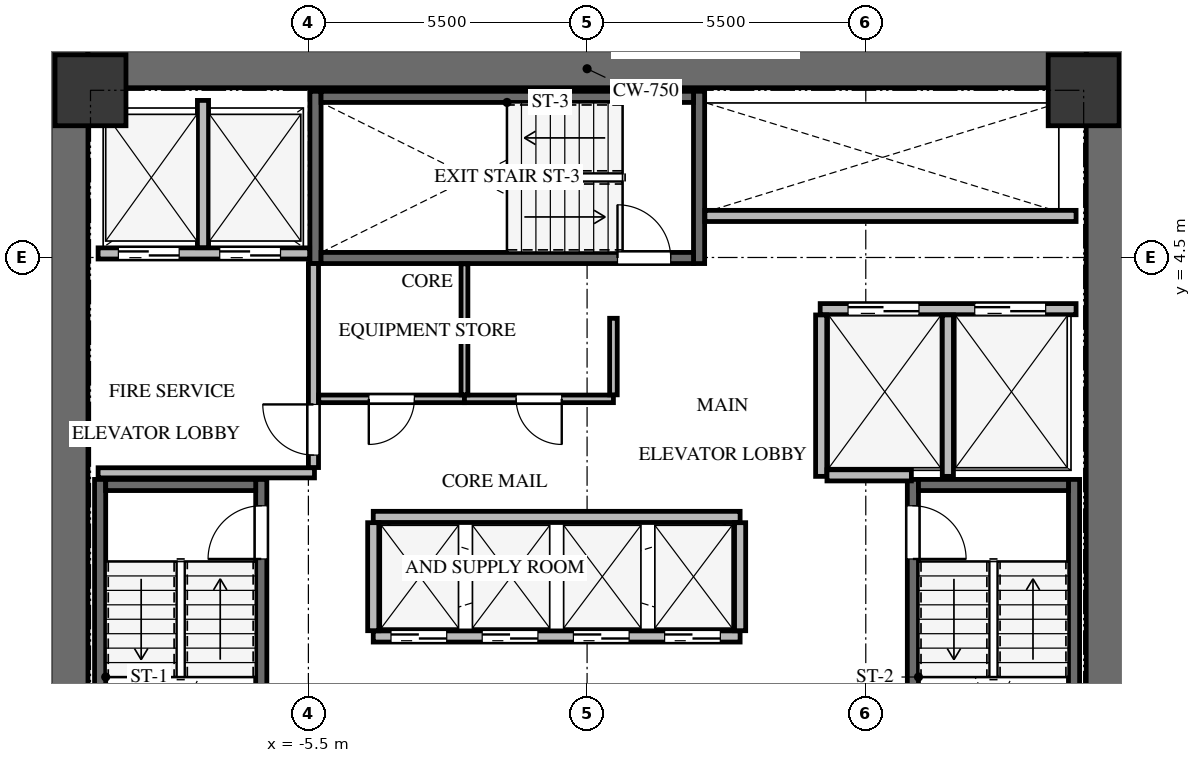
"""IFC4 building model, lengths in metres.
Left out: names, types, materials, properties, quantities, classifications, styles, units other than length and angle.
Written with IfcOpenShell. Run it as: python <this file> out.ifc"""

import sys

from ifc_helpers import new_model, si_unit, direction, frame, frame_2d, origin, origin_2d, place, context, subcontext, project, spatial, rectangle, extrude, source, transform, mapped, element, fill, save


model = new_model("IFC4")
c1 = context("Model", 3, precision=1e-05, world=origin(), true_north=direction((0.0, 1.0)))
c2 = subcontext(c1, "Body", "Model", "MODEL_VIEW")
j1 = project(units=[si_unit("LENGTHUNIT", "METRE"), si_unit("PLANEANGLEUNIT", "RADIAN")], contexts=[c1])
p1 = place(None, origin())
s1 = spatial("IfcSite", under=j1, at=p1, CompositionType="ELEMENT")
p2 = place(p1, origin())
s2 = spatial("IfcBuilding", under=s1, at=p2, CompositionType="ELEMENT")
p3 = place(p2, frame((0.0, 0.0, 143.1)))
s3 = spatial("IfcBuildingStorey", under=s2, at=p3, CompositionType="ELEMENT", Elevation=143.1)
for number, where, z_axis, x_axis in (
    (1, (-10.225, -8.6, 0.0), (0.0, 0.0, 1.0), (0.0, 1.0, 0.0)),
    (2, (10.225, -8.6, 0.0), (0.0, 0.0, 1.0), (0.0, 1.0, 0.0)),
):
    element("IfcWall", number, at=place(p3, frame(where, z_axis=z_axis, x_axis=x_axis)), inside=s3, PredefinedType="SHEAR", context=c2, shape_type="SweptSolid", body=[
        extrude(rectangle(XDim=17.2, YDim=0.75, at=frame_2d((8.6, 0.0))), origin(), (0.0, 0.0, 1.0), 3.0),
    ])
p4 = place(p3, frame((-9.85, 8.225, 0.0), z_axis=(0.0, 0.0, 1.0), x_axis=(1.0, 0.0, 0.0)))
e3 = element("IfcWall", 3, at=p4, inside=s3, PredefinedType="SHEAR", context=c2, shape_type="SweptSolid", body=[
    extrude(rectangle(XDim=19.7, YDim=0.75, at=frame_2d((9.85, 0.0))), origin(), (0.0, 0.0, 1.0), 3.0),
])
p5 = place(p3, frame((-6.43, -7.77, -0.24), z_axis=(0.0, 0.0, 1.0), x_axis=(0.0, 1.0, 0.0)))
e4 = element("IfcWall", 4, at=p5, inside=s3, PredefinedType="SHEAR", context=c2, shape_type="SweptSolid", body=[
    extrude(rectangle(XDim=7.89, YDim=0.22, at=frame_2d((3.945, 0.0))), origin(), (0.0, 0.0, 1.0), 3.0),
])
p6 = place(p5, frame((6.32, 0.0, 0.0)))
e5 = element("IfcOpeningElement", 5, at=p6, cuts=e4, PredefinedType="OPENING", context=c2, shape_type="SweptSolid", body=[
    extrude(rectangle(XDim=1.05, YDim=2.15, at=frame_2d((0.525, 1.075))), frame((0.0, 0.12, 0.0), z_axis=(0.0, -1.0, 0.0), x_axis=(1.0, 0.0, 0.0)), (0.0, 0.0, 1.0), 0.24),
])
p7 = place(p3, frame((-9.61, 0.12, -0.24), z_axis=(0.0, 0.0, 1.0), x_axis=(0.0, -1.0, 0.0)))
e6 = element("IfcWall", 6, at=p7, inside=s3, PredefinedType="SHEAR", context=c2, shape_type="SweptSolid", body=[
    extrude(rectangle(XDim=7.89, YDim=0.22, at=frame_2d((3.945, 0.0))), origin(), (0.0, 0.0, 1.0), 3.0),
])
p8 = place(p3, frame((-6.54, 0.01, -0.24), z_axis=(0.0, 0.0, 1.0), x_axis=(-1.0, 0.0, 0.0)))
e7 = element("IfcWall", 7, at=p8, inside=s3, PredefinedType="SHEAR", context=c2, shape_type="SweptSolid", body=[
    extrude(rectangle(XDim=2.96, YDim=0.22, at=frame_2d((1.48, 0.0))), origin(), (0.0, 0.0, 1.0), 3.0),
])
p9 = place(p3, frame((9.61, -7.77, -0.24), z_axis=(0.0, 0.0, 1.0), x_axis=(0.0, 1.0, 0.0)))
e8 = element("IfcWall", 8, at=p9, inside=s3, PredefinedType="SHEAR", context=c2, shape_type="SweptSolid", body=[
    extrude(rectangle(XDim=7.89, YDim=0.22, at=frame_2d((3.945, 0.0))), origin(), (0.0, 0.0, 1.0), 3.0),
])
p10 = place(p3, frame((6.43, 0.12, -0.24), z_axis=(0.0, 0.0, 1.0), x_axis=(0.0, -1.0, 0.0)))
e9 = element("IfcWall", 9, at=p10, inside=s3, PredefinedType="SHEAR", context=c2, shape_type="SweptSolid", body=[
    extrude(rectangle(XDim=7.89, YDim=0.22, at=frame_2d((3.945, 0.0))), origin(), (0.0, 0.0, 1.0), 3.0),
])
p11 = place(p10, frame((0.52, 0.0, 0.0)))
e10 = element("IfcOpeningElement", 10, at=p11, cuts=e9, PredefinedType="OPENING", context=c2, shape_type="SweptSolid", body=[
    extrude(rectangle(XDim=1.05, YDim=2.15, at=frame_2d((0.525, 1.075))), frame((0.0, 0.12, 0.0), z_axis=(0.0, -1.0, 0.0), x_axis=(1.0, 0.0, 0.0)), (0.0, 0.0, 1.0), 0.24),
])
p12 = place(p3, frame((9.5, 0.01, -0.24), z_axis=(0.0, 0.0, 1.0), x_axis=(-1.0, 0.0, 0.0)))
e11 = element("IfcWall", 11, at=p12, inside=s3, PredefinedType="SHEAR", context=c2, shape_type="SweptSolid", body=[
    extrude(rectangle(XDim=2.96, YDim=0.22, at=frame_2d((1.48, 0.0))), origin(), (0.0, 0.0, 1.0), 3.0),
])
for number, where, z_axis, x_axis in (
    (12, (2.21, 4.38, -0.24), (0.0, 0.0, 1.0), (0.0, 1.0, 0.0)),
    (13, (-5.36, 7.78, -0.24), (0.0, 0.0, 1.0), (0.0, -1.0, 0.0)),
):
    element("IfcWall", number, at=place(p3, frame(where, z_axis=z_axis, x_axis=x_axis)), inside=s3, PredefinedType="SHEAR", context=c2, shape_type="SweptSolid", body=[
        extrude(rectangle(XDim=3.4, YDim=0.22, at=frame_2d((1.7, 0.0))), origin(), (0.0, 0.0, 1.0), 3.0),
    ])
p13 = place(p3, frame((-5.25, 4.49, -0.24), z_axis=(0.0, 0.0, 1.0), x_axis=(1.0, 0.0, 0.0)))
e14 = element("IfcWall", 14, at=p13, inside=s3, PredefinedType="SHEAR", context=c2, shape_type="SweptSolid", body=[
    extrude(rectangle(XDim=7.35, YDim=0.22, at=frame_2d((3.675, 0.0))), origin(), (0.0, 0.0, 1.0), 3.0),
])
p14 = place(p13, frame((5.85, 0.0, 0.0)))
e15 = element("IfcOpeningElement", 15, at=p14, cuts=e14, PredefinedType="OPENING", context=c2, shape_type="SweptSolid", body=[
    extrude(rectangle(XDim=1.05, YDim=2.15, at=frame_2d((0.525, 1.075))), frame((0.0, 0.12, 0.0), z_axis=(0.0, -1.0, 0.0), x_axis=(1.0, 0.0, 0.0)), (0.0, 0.0, 1.0), 0.24),
])
p15 = place(p3, frame((2.1, 7.67, -0.24), z_axis=(0.0, 0.0, 1.0), x_axis=(-1.0, 0.0, 0.0)))
e16 = element("IfcWall", 16, at=p15, inside=s3, PredefinedType="SHEAR", context=c2, shape_type="SweptSolid", body=[
    extrude(rectangle(XDim=7.35, YDim=0.22, at=frame_2d((3.675, 0.0))), origin(), (0.0, 0.0, 1.0), 3.0),
])
m1 = source(origin(), c2, "Body", "SweptSolid", [
    extrude(rectangle(XDim=1.4, YDim=1.4, at=origin_2d()), origin(), (0.0, 0.0, 1.0), 3.0),
])
for number, where, z_axis, x_axis in (
    (17, (9.8, 7.8, -0.24), (0.0, 0.0, 1.0), (1.0, 0.0, 0.0)),
    (18, (-9.8, 7.8, -0.24), (0.0, 0.0, 1.0), (1.0, 0.0, 0.0)),
):
    element("IfcColumn", number, at=place(p3, frame(where, z_axis=z_axis, x_axis=x_axis)), inside=s3, PredefinedType="COLUMN", context=c2, shape_type="MappedRepresentation", body=[
        mapped(m1, transform((0.0, 0.0, 0.0), x_axis=(1.0, 0.0, 0.0), y_axis=(0.0, 1.0, 0.0), z_axis=(0.0, 0.0, 1.0), scale=1.0)),
    ])
p16 = place(p3, frame((-9.65, 4.58, 0.0), z_axis=(0.0, 0.0, 1.0), x_axis=(1.0, 0.0, 0.0)))
e19 = element("IfcWall", 19, at=p16, inside=s3, PredefinedType="SOLIDWALL", context=c2, shape_type="SweptSolid", body=[
    extrude(rectangle(XDim=4.175, YDim=0.22, at=frame_2d((2.087, 0.0))), origin(), (0.0, 0.0, 1.0), 2.745),
])
p17 = place(p16, frame((0.4, 0.0, 0.0)))
e20 = element("IfcOpeningElement", 20, at=p17, cuts=e19, PredefinedType="OPENING", context=c2, shape_type="SweptSolid", body=[
    extrude(rectangle(XDim=1.2, YDim=2.15, at=frame_2d((0.6, 1.075))), frame((0.0, 0.12, 0.0), z_axis=(0.0, -1.0, 0.0), x_axis=(1.0, 0.0, 0.0)), (0.0, 0.0, 1.0), 0.24),
])
p18 = place(p16, frame((2.4, 0.0, 0.0)))
e21 = element("IfcOpeningElement", 21, at=p18, cuts=e19, PredefinedType="OPENING", context=c2, shape_type="SweptSolid", body=[
    extrude(rectangle(XDim=1.2, YDim=2.15, at=frame_2d((0.6, 1.075))), frame((0.0, 0.12, 0.0), z_axis=(0.0, -1.0, 0.0), x_axis=(1.0, 0.0, 0.0)), (0.0, 0.0, 1.0), 0.24),
])
p19 = place(p3, frame((-7.58, 4.694, 0.0), z_axis=(0.0, 0.0, 1.0), x_axis=(0.0, 1.0, 0.0)))
e22 = element("IfcWall", 22, at=p19, inside=s3, PredefinedType="SOLIDWALL", context=c2, shape_type="SweptSolid", body=[
    extrude(rectangle(XDim=2.906, YDim=0.22, at=frame_2d((1.453, 0.0))), origin(), (0.0, 0.0, 1.0), 2.745),
])
p20 = place(p3, frame((-9.65, 0.25, 0.0), z_axis=(0.0, 0.0, 1.0), x_axis=(1.0, 0.0, 0.0)))
e23 = element("IfcWall", 23, at=p20, inside=s3, PredefinedType="SOLIDWALL", context=c2, shape_type="SweptSolid", body=[
    extrude(rectangle(XDim=4.27, YDim=0.2, at=frame_2d((2.135, 0.0))), origin(), (0.0, 0.0, 1.0), 2.745),
])
p21 = place(p3, frame((-5.4, 0.354, 0.0), z_axis=(0.0, 0.0, 1.0), x_axis=(0.0, 1.0, 0.0)))
e24 = element("IfcWall", 24, at=p21, inside=s3, PredefinedType="SOLIDWALL", context=c2, shape_type="SweptSolid", body=[
    extrude(rectangle(XDim=4.026, YDim=0.2, at=frame_2d((2.013, 0.0))), origin(), (0.0, 0.0, 1.0), 2.745),
])
p22 = place(p21, frame((0.246, 0.0, 0.0)))
e25 = element("IfcOpeningElement", 25, at=p22, cuts=e24, PredefinedType="OPENING", context=c2, shape_type="SweptSolid", body=[
    extrude(rectangle(XDim=1.0, YDim=2.15, at=frame_2d((0.5, 1.075))), frame((0.0, 0.11, 0.0), z_axis=(0.0, -1.0, 0.0), x_axis=(1.0, 0.0, 0.0)), (0.0, 0.0, 1.0), 0.22),
])
p23 = place(p3, frame((4.6, 3.48, 0.0), z_axis=(0.0, 0.0, 1.0), x_axis=(1.0, 0.0, 0.0)))
e26 = element("IfcWall", 26, at=p23, inside=s3, PredefinedType="SOLIDWALL", context=c2, shape_type="SweptSolid", body=[
    extrude(rectangle(XDim=5.05, YDim=0.22, at=frame_2d((2.525, 0.0))), origin(), (0.0, 0.0, 1.0), 2.745),
])
p24 = place(p23, frame((0.55, 0.0, 0.0)))
e27 = element("IfcOpeningElement", 27, at=p24, cuts=e26, PredefinedType="OPENING", context=c2, shape_type="SweptSolid", body=[
    extrude(rectangle(XDim=1.4, YDim=2.15, at=frame_2d((0.7, 1.075))), frame((0.0, 0.12, 0.0), z_axis=(0.0, -1.0, 0.0), x_axis=(1.0, 0.0, 0.0)), (0.0, 0.0, 1.0), 0.24),
])
p25 = place(p23, frame((3.05, 0.0, 0.0)))
e28 = element("IfcOpeningElement", 28, at=p25, cuts=e26, PredefinedType="OPENING", context=c2, shape_type="SweptSolid", body=[
    extrude(rectangle(XDim=1.4, YDim=2.15, at=frame_2d((0.7, 1.075))), frame((0.0, 0.12, 0.0), z_axis=(0.0, -1.0, 0.0), x_axis=(1.0, 0.0, 0.0)), (0.0, 0.0, 1.0), 0.24),
])
for number, where, z_axis, x_axis in (
    (29, (4.62, 0.18, 0.0), (0.0, 0.0, 1.0), (0.0, 1.0, 0.0)),
    (30, (7.12, 0.18, 0.0), (0.0, 0.0, 1.0), (0.0, 1.0, 0.0)),
):
    element("IfcWall", number, at=place(p3, frame(where, z_axis=z_axis, x_axis=x_axis)), inside=s3, PredefinedType="SOLIDWALL", context=c2, shape_type="SweptSolid", body=[
        extrude(rectangle(XDim=3.186, YDim=0.22, at=frame_2d((1.593, 0.0))), origin(), (0.0, 0.0, 1.0), 2.745),
    ])
p26 = place(p3, frame((4.734, 0.2, 0.0), z_axis=(0.0, 0.0, 1.0), x_axis=(1.0, 0.0, 0.0)))
e31 = element("IfcWall", 31, at=p26, inside=s3, PredefinedType="SOLIDWALL", context=c2, shape_type="SweptSolid", body=[
    extrude(rectangle(XDim=1.666, YDim=0.22, at=frame_2d((0.833, 0.0))), origin(), (0.0, 0.0, 1.0), 2.745),
])
p27 = place(p3, frame((-4.22, -2.98, 0.0), z_axis=(0.0, 0.0, 1.0), x_axis=(1.0, 0.0, 0.0)))
e32 = element("IfcWall", 32, at=p27, inside=s3, PredefinedType="SOLIDWALL", context=c2, shape_type="SweptSolid", body=[
    extrude(rectangle(XDim=7.24, YDim=0.22, at=frame_2d((3.62, 0.0))), origin(), (0.0, 0.0, 1.0), 2.745),
])
p28 = place(p27, frame((0.35, 0.0, 0.0)))
e33 = element("IfcOpeningElement", 33, at=p28, cuts=e32, PredefinedType="OPENING", context=c2, shape_type="SweptSolid", body=[
    extrude(rectangle(XDim=1.1, YDim=2.15, at=frame_2d((0.55, 1.075))), frame((0.0, 0.12, 0.0), z_axis=(0.0, -1.0, 0.0), x_axis=(1.0, 0.0, 0.0)), (0.0, 0.0, 1.0), 0.24),
])
p29 = place(p27, frame((2.15, 0.0, 0.0)))
e34 = element("IfcOpeningElement", 34, at=p29, cuts=e32, PredefinedType="OPENING", context=c2, shape_type="SweptSolid", body=[
    extrude(rectangle(XDim=1.1, YDim=2.15, at=frame_2d((0.55, 1.075))), frame((0.0, 0.12, 0.0), z_axis=(0.0, -1.0, 0.0), x_axis=(1.0, 0.0, 0.0)), (0.0, 0.0, 1.0), 0.24),
])
p30 = place(p27, frame((3.95, 0.0, 0.0)))
e35 = element("IfcOpeningElement", 35, at=p30, cuts=e32, PredefinedType="OPENING", context=c2, shape_type="SweptSolid", body=[
    extrude(rectangle(XDim=1.1, YDim=2.15, at=frame_2d((0.55, 1.075))), frame((0.0, 0.12, 0.0), z_axis=(0.0, -1.0, 0.0), x_axis=(1.0, 0.0, 0.0)), (0.0, 0.0, 1.0), 0.24),
])
p31 = place(p27, frame((5.75, 0.0, 0.0)))
e36 = element("IfcOpeningElement", 36, at=p31, cuts=e32, PredefinedType="OPENING", context=c2, shape_type="SweptSolid", body=[
    extrude(rectangle(XDim=1.1, YDim=2.15, at=frame_2d((0.55, 1.075))), frame((0.0, 0.12, 0.0), z_axis=(0.0, -1.0, 0.0), x_axis=(1.0, 0.0, 0.0)), (0.0, 0.0, 1.0), 0.24),
])
p32 = place(p3, frame((-4.22, -0.62, 0.0), z_axis=(0.0, 0.0, 1.0), x_axis=(1.0, 0.0, 0.0)))
e37 = element("IfcWall", 37, at=p32, inside=s3, PredefinedType="SOLIDWALL", context=c2, shape_type="SweptSolid", body=[
    extrude(rectangle(XDim=7.24, YDim=0.22, at=frame_2d((3.62, 0.0))), origin(), (0.0, 0.0, 1.0), 2.745),
])
for number, where, z_axis, x_axis in (
    (38, (-4.22, -2.866, 0.0), (0.0, 0.0, 1.0), (0.0, 1.0, 0.0)),
    (39, (3.02, -2.866, 0.0), (0.0, 0.0, 1.0), (0.0, 1.0, 0.0)),
):
    element("IfcWall", number, at=place(p3, frame(where, z_axis=z_axis, x_axis=x_axis)), inside=s3, PredefinedType="SOLIDWALL", context=c2, shape_type="SweptSolid", body=[
        extrude(rectangle(XDim=2.132, YDim=0.22, at=frame_2d((1.066, 0.0))), origin(), (0.0, 0.0, 1.0), 2.745),
    ])
p33 = place(p3, frame((2.325, 5.32, 0.0), z_axis=(0.0, 0.0, 1.0), x_axis=(1.0, 0.0, 0.0)))
e40 = element("IfcWall", 40, at=p33, inside=s3, PredefinedType="SOLIDWALL", context=c2, shape_type="SweptSolid", body=[
    extrude(rectangle(XDim=7.325, YDim=0.22, at=frame_2d((3.663, 0.0))), origin(), (0.0, 0.0, 1.0), 2.745),
])
p34 = place(p3, frame((-2.42, 1.71, 0.0), z_axis=(0.0, 0.0, 1.0), x_axis=(-1.0, 0.0, 0.0)))
e41 = element("IfcWall", 41, at=p34, inside=s3, PredefinedType="PARTITIONING", context=c2, shape_type="SweptSolid", body=[
    extrude(rectangle(XDim=2.876, YDim=0.15, at=frame_2d((1.438, 0.0))), origin(), (0.0, 0.0, 1.0), 2.745),
])
p35 = place(p34, frame((0.988, 0.0, 0.0)))
e42 = element("IfcOpeningElement", 42, at=p35, cuts=e41, PredefinedType="OPENING", context=c2, shape_type="SweptSolid", body=[
    extrude(rectangle(XDim=0.9, YDim=2.05, at=frame_2d((0.45, 1.025))), frame((0.0, 0.085, 0.0), z_axis=(0.0, -1.0, 0.0), x_axis=(1.0, 0.0, 0.0)), (0.0, 0.0, 1.0), 0.17),
])
p36 = place(p3, frame((0.52, 1.71, 0.0), z_axis=(0.0, 0.0, 1.0), x_axis=(-1.0, 0.0, 0.0)))
e43 = element("IfcWall", 43, at=p36, inside=s3, PredefinedType="PARTITIONING", context=c2, shape_type="SweptSolid", body=[
    extrude(rectangle(XDim=2.94, YDim=0.15, at=frame_2d((1.47, 0.0))), origin(), (0.0, 0.0, 1.0), 2.745),
])
p37 = place(p36, frame((1.02, 0.0, 0.0)))
e44 = element("IfcOpeningElement", 44, at=p37, cuts=e43, PredefinedType="OPENING", context=c2, shape_type="SweptSolid", body=[
    extrude(rectangle(XDim=0.9, YDim=2.05, at=frame_2d((0.45, 1.025))), frame((0.0, 0.085, 0.0), z_axis=(0.0, -1.0, 0.0), x_axis=(1.0, 0.0, 0.0)), (0.0, 0.0, 1.0), 0.17),
])
p38 = place(p3, frame((0.52, 3.3, 0.0), z_axis=(0.0, 0.0, 1.0), x_axis=(0.0, -1.0, 0.0)))
e45 = element("IfcWall", 45, at=p38, inside=s3, PredefinedType="PARTITIONING", context=c2, shape_type="SweptSolid", body=[
    extrude(rectangle(XDim=1.511, YDim=0.15, at=frame_2d((0.755, 0.0))), origin(), (0.0, 0.0, 1.0), 2.745),
])
p39 = place(p3, frame((-2.42, 4.375, 0.0), z_axis=(0.0, 0.0, 1.0), x_axis=(0.0, -1.0, 0.0)))
e46 = element("IfcWall", 46, at=p39, inside=s3, PredefinedType="PARTITIONING", context=c2, shape_type="SweptSolid", body=[
    extrude(rectangle(XDim=2.586, YDim=0.135, at=frame_2d((1.293, 0.0))), origin(), (0.0, 0.0, 1.0), 2.745),
])
m2 = source(origin(), c2, "Body", "SweptSolid", [
    extrude(rectangle(XDim=1.05, YDim=2.15, at=frame_2d((0.525, 1.075))), frame((0.0, 0.025, 0.0), z_axis=(0.0, -1.0, 0.0), x_axis=(1.0, 0.0, 0.0)), (0.0, 0.0, 1.0), 0.05),
])
p40 = place(p6, origin())
e47 = element("IfcDoor", 47, at=p40, inside=s3, OperationType="SINGLE_SWING_LEFT", PredefinedType="DOOR", context=c2, shape_type="MappedRepresentation", body=[
    mapped(m2, transform((0.0, 0.0, 0.0), x_axis=(1.0, 0.0, 0.0), y_axis=(0.0, 1.0, 0.0), z_axis=(0.0, 0.0, 1.0), scale=1.0)),
])
fill(e5, e47)
m3 = source(origin(), c2, "Body", "SweptSolid", [
    extrude(rectangle(XDim=1.05, YDim=2.15, at=frame_2d((0.525, 1.075))), frame((0.0, 0.025, 0.0), z_axis=(0.0, -1.0, 0.0), x_axis=(1.0, 0.0, 0.0)), (0.0, 0.0, 1.0), 0.05),
])
p41 = place(p11, origin())
e48 = element("IfcDoor", 48, at=p41, inside=s3, OperationType="SINGLE_SWING_RIGHT", PredefinedType="DOOR", context=c2, shape_type="MappedRepresentation", body=[
    mapped(m3, transform((0.0, 0.0, 0.0), x_axis=(1.0, 0.0, 0.0), y_axis=(0.0, 1.0, 0.0), z_axis=(0.0, 0.0, 1.0), scale=1.0)),
])
fill(e10, e48)
p42 = place(p14, origin())
e49 = element("IfcDoor", 49, at=p42, inside=s3, OperationType="SINGLE_SWING_LEFT", PredefinedType="DOOR", context=c2, shape_type="MappedRepresentation", body=[
    mapped(m2, transform((0.0, 0.0, 0.0), x_axis=(1.0, 0.0, 0.0), y_axis=(0.0, 1.0, 0.0), z_axis=(0.0, 0.0, 1.0), scale=1.0)),
])
fill(e15, e49)
m4 = source(origin(), c2, "Body", "SweptSolid", [
    extrude(rectangle(XDim=1.2, YDim=2.15, at=frame_2d((0.6, 1.075))), frame((0.0, 0.025, 0.0), z_axis=(0.0, -1.0, 0.0), x_axis=(1.0, 0.0, 0.0)), (0.0, 0.0, 1.0), 0.05),
])
p43 = place(p17, origin())
e50 = element("IfcDoor", 50, at=p43, inside=s3, OperationType="DOUBLE_DOOR_SLIDING", PredefinedType="DOOR", context=c2, shape_type="MappedRepresentation", body=[
    mapped(m4, transform((0.0, 0.0, 0.0), x_axis=(1.0, 0.0, 0.0), y_axis=(0.0, 1.0, 0.0), z_axis=(0.0, 0.0, 1.0), scale=1.0)),
])
fill(e20, e50)
p44 = place(p18, origin())
e51 = element("IfcDoor", 51, at=p44, inside=s3, OperationType="DOUBLE_DOOR_SLIDING", PredefinedType="DOOR", context=c2, shape_type="MappedRepresentation", body=[
    mapped(m4, transform((0.0, 0.0, 0.0), x_axis=(1.0, 0.0, 0.0), y_axis=(0.0, 1.0, 0.0), z_axis=(0.0, 0.0, 1.0), scale=1.0)),
])
fill(e21, e51)
m5 = source(origin(), c2, "Body", "SweptSolid", [
    extrude(rectangle(XDim=1.0, YDim=2.15, at=frame_2d((0.5, 1.075))), frame((0.0, 0.025, 0.0), z_axis=(0.0, -1.0, 0.0), x_axis=(1.0, 0.0, 0.0)), (0.0, 0.0, 1.0), 0.05),
])
p45 = place(p22, origin())
e52 = element("IfcDoor", 52, at=p45, inside=s3, OperationType="SINGLE_SWING_RIGHT", PredefinedType="DOOR", context=c2, shape_type="MappedRepresentation", body=[
    mapped(m5, transform((0.0, 0.0, 0.0), x_axis=(1.0, 0.0, 0.0), y_axis=(0.0, 1.0, 0.0), z_axis=(0.0, 0.0, 1.0), scale=1.0)),
])
fill(e25, e52)
m6 = source(origin(), c2, "Body", "SweptSolid", [
    extrude(rectangle(XDim=1.4, YDim=2.15, at=frame_2d((0.7, 1.075))), frame((0.0, 0.025, 0.0), z_axis=(0.0, -1.0, 0.0), x_axis=(1.0, 0.0, 0.0)), (0.0, 0.0, 1.0), 0.05),
])
p46 = place(p24, origin())
e53 = element("IfcDoor", 53, at=p46, inside=s3, OperationType="DOUBLE_DOOR_SLIDING", PredefinedType="DOOR", context=c2, shape_type="MappedRepresentation", body=[
    mapped(m6, transform((0.0, 0.0, 0.0), x_axis=(1.0, 0.0, 0.0), y_axis=(0.0, 1.0, 0.0), z_axis=(0.0, 0.0, 1.0), scale=1.0)),
])
fill(e27, e53)
p47 = place(p25, origin())
e54 = element("IfcDoor", 54, at=p47, inside=s3, OperationType="DOUBLE_DOOR_SLIDING", PredefinedType="DOOR", context=c2, shape_type="MappedRepresentation", body=[
    mapped(m6, transform((0.0, 0.0, 0.0), x_axis=(1.0, 0.0, 0.0), y_axis=(0.0, 1.0, 0.0), z_axis=(0.0, 0.0, 1.0), scale=1.0)),
])
fill(e28, e54)
m7 = source(origin(), c2, "Body", "SweptSolid", [
    extrude(rectangle(XDim=1.1, YDim=2.15, at=frame_2d((0.55, 1.075))), frame((0.0, 0.025, 0.0), z_axis=(0.0, -1.0, 0.0), x_axis=(1.0, 0.0, 0.0)), (0.0, 0.0, 1.0), 0.05),
])
p48 = place(p28, origin())
e55 = element("IfcDoor", 55, at=p48, inside=s3, OperationType="DOUBLE_DOOR_SLIDING", PredefinedType="DOOR", context=c2, shape_type="MappedRepresentation", body=[
    mapped(m7, transform((0.0, 0.0, 0.0), x_axis=(1.0, 0.0, 0.0), y_axis=(0.0, 1.0, 0.0), z_axis=(0.0, 0.0, 1.0), scale=1.0)),
])
fill(e33, e55)
p49 = place(p29, origin())
e56 = element("IfcDoor", 56, at=p49, inside=s3, OperationType="DOUBLE_DOOR_SLIDING", PredefinedType="DOOR", context=c2, shape_type="MappedRepresentation", body=[
    mapped(m7, transform((0.0, 0.0, 0.0), x_axis=(1.0, 0.0, 0.0), y_axis=(0.0, 1.0, 0.0), z_axis=(0.0, 0.0, 1.0), scale=1.0)),
])
fill(e34, e56)
p50 = place(p30, origin())
e57 = element("IfcDoor", 57, at=p50, inside=s3, OperationType="DOUBLE_DOOR_SLIDING", PredefinedType="DOOR", context=c2, shape_type="MappedRepresentation", body=[
    mapped(m7, transform((0.0, 0.0, 0.0), x_axis=(1.0, 0.0, 0.0), y_axis=(0.0, 1.0, 0.0), z_axis=(0.0, 0.0, 1.0), scale=1.0)),
])
fill(e35, e57)
p51 = place(p31, origin())
e58 = element("IfcDoor", 58, at=p51, inside=s3, OperationType="DOUBLE_DOOR_SLIDING", PredefinedType="DOOR", context=c2, shape_type="MappedRepresentation", body=[
    mapped(m7, transform((0.0, 0.0, 0.0), x_axis=(1.0, 0.0, 0.0), y_axis=(0.0, 1.0, 0.0), z_axis=(0.0, 0.0, 1.0), scale=1.0)),
])
fill(e36, e58)
m8 = source(origin(), c2, "Body", "SweptSolid", [
    extrude(rectangle(XDim=0.9, YDim=2.05, at=frame_2d((0.45, 1.025))), frame((0.0, 0.025, 0.0), z_axis=(0.0, -1.0, 0.0), x_axis=(1.0, 0.0, 0.0)), (0.0, 0.0, 1.0), 0.05),
])
p52 = place(p35, origin())
e59 = element("IfcDoor", 59, at=p52, inside=s3, OperationType="SINGLE_SWING_RIGHT", PredefinedType="DOOR", context=c2, shape_type="MappedRepresentation", body=[
    mapped(m8, transform((0.0, 0.0, 0.0), x_axis=(1.0, 0.0, 0.0), y_axis=(0.0, 1.0, 0.0), z_axis=(0.0, 0.0, 1.0), scale=1.0)),
])
fill(e42, e59)
m9 = source(origin(), c2, "Body", "SweptSolid", [
    extrude(rectangle(XDim=0.9, YDim=2.05, at=frame_2d((0.45, 1.025))), frame((0.0, 0.025, 0.0), z_axis=(0.0, -1.0, 0.0), x_axis=(1.0, 0.0, 0.0)), (0.0, 0.0, 1.0), 0.05),
])
p53 = place(p37, origin())
e60 = element("IfcDoor", 60, at=p53, inside=s3, OperationType="SINGLE_SWING_LEFT", PredefinedType="DOOR", context=c2, shape_type="MappedRepresentation", body=[
    mapped(m9, transform((0.0, 0.0, 0.0), x_axis=(1.0, 0.0, 0.0), y_axis=(0.0, 1.0, 0.0), z_axis=(0.0, 0.0, 1.0), scale=1.0)),
])
fill(e44, e60)
save(model, sys.argv[1])
